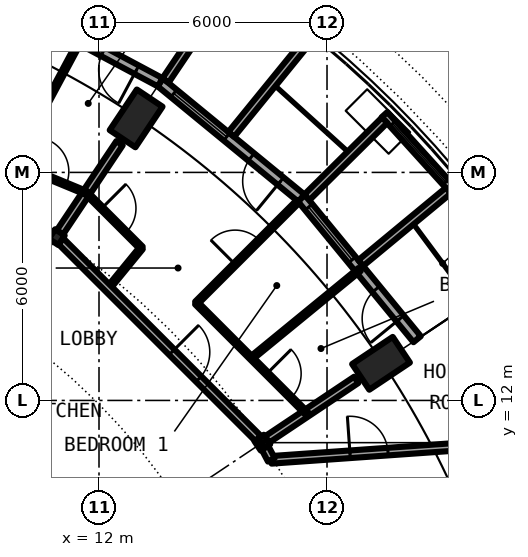
"""IFC4 building model, lengths in metres.
Left out: names, types, materials, properties, quantities, classifications, styles, units other than length and angle.
Written with IfcOpenShell. Run it as: python <this file> out.ifc"""

import sys

from ifc_helpers import new_model, si_unit, direction, frame, frame_2d, origin, origin_2d, place, context, subcontext, project, spatial, rectangle, circle, hollow_circle, i_section, extrude, element, fill, save


model = new_model("IFC4")
c1 = context("Model", 3, precision=1e-05, world=origin(), true_north=direction((0.0, 1.0)))
c2 = subcontext(c1, "Body", "Model", "MODEL_VIEW")
j1 = project(units=[si_unit("LENGTHUNIT", "METRE"), si_unit("PLANEANGLEUNIT", "RADIAN")], contexts=[c1])
p1 = place(None, origin())
s1 = spatial("IfcSite", under=j1, at=p1, CompositionType="ELEMENT")
p2 = place(p1, origin())
s2 = spatial("IfcBuilding", under=s1, at=p2, CompositionType="ELEMENT")
p3 = place(p2, frame((0.0, 0.0, 246.25)))
s3 = spatial("IfcBuildingStorey", under=s2, at=p3, CompositionType="ELEMENT", Elevation=246.25)
for number, where, z_axis, x_axis in (
    (1, (19.955, 13.334, 0.0), (-0.347, -0.232, 0.909), (0.556, -0.831, 0.0)),
    (2, (13.334, 19.955, 0.0), (-0.232, -0.347, 0.909), (0.831, -0.556, 0.0)),
):
    element("IfcColumn", number, at=place(p3, frame(where, z_axis=z_axis, x_axis=x_axis)), inside=s3, PredefinedType="COLUMN", context=c2, shape_type="SweptSolid", body=[
        extrude(hollow_circle(Radius=0.406, WallThickness=0.03, at=origin_2d()), origin(), (0.0, 0.0, 1.0), 3.081),
    ])
for number, where, z_axis, x_axis in (
    (3, (16.297, 10.889, 0.0), (0.0, 0.0, 1.0), (0.831, 0.556, 0.0)),
    (4, (10.889, 16.297, 0.0), (0.0, 0.0, 1.0), (0.556, 0.831, 0.0)),
):
    element("IfcColumn", number, at=place(p3, frame(where, z_axis=z_axis, x_axis=x_axis)), inside=s3, PredefinedType="COLUMN", context=c2, shape_type="SweptSolid", body=[
        extrude(i_section(OverallWidth=0.3, OverallDepth=0.3, WebThickness=0.011, FlangeThickness=0.019, FilletRadius=0.027, at=origin_2d()), origin(), (0.0, 0.0, 1.0), 3.05),
    ])
p4 = place(p3, frame((20.371, 13.611, 0.0), z_axis=(0.0, 0.0, 1.0), x_axis=(-0.634396836208, 0.773007538262, 0.0)))
e5 = element("IfcWall", 5, at=p4, inside=s3, PredefinedType="SOLIDWALL", context=c2, shape_type="SweptSolid", body=[
    extrude(rectangle(XDim=4.803, YDim=0.25, at=frame_2d((2.402, 0.0))), origin(), (0.0, 0.0, 1.0), 2.7),
])
p5 = place(p4, frame((0.704, 0.0, 0.0)))
e6 = element("IfcOpeningElement", 6, at=p5, cuts=e5, PredefinedType="OPENING", context=c2, shape_type="SweptSolid", body=[
    extrude(rectangle(XDim=1.0, YDim=2.2, at=frame_2d((0.5, 1.1))), frame((0.0, 0.135, 0.0), z_axis=(0.0, -1.0, 0.0), x_axis=(1.0, 0.0, 0.0)), (0.0, 0.0, 1.0), 0.27),
])
p6 = place(p4, frame((2.699, 0.0, 0.3)))
e7 = element("IfcOpeningElement", 7, at=p6, cuts=e5, PredefinedType="OPENING", context=c2, shape_type="SweptSolid", body=[
    extrude(rectangle(XDim=1.8, YDim=2.1, at=frame_2d((0.9, 1.05))), frame((0.0, 0.135, 0.0), z_axis=(0.0, -1.0, 0.0), x_axis=(1.0, 0.0, 0.0)), (0.0, 0.0, 1.0), 0.27),
])
p7 = place(p3, frame((21.338, 17.506, -0.03), z_axis=(0.0, 0.0, 1.0), x_axis=(-0.671487056022, 0.741016284298, 0.0)))
e8 = element("IfcWall", 8, at=p7, inside=s3, PredefinedType="SOLIDWALL", context=c2, shape_type="SweptSolid", body=[
    extrude(rectangle(XDim=2.718, YDim=0.2, at=frame_2d((1.359, 0.0))), origin(), (0.0, 0.0, 1.0), 2.73),
])
p8 = place(p7, frame((0.319, 0.0, 0.33)))
e9 = element("IfcOpeningElement", 9, at=p8, cuts=e8, PredefinedType="OPENING", context=c2, shape_type="SweptSolid", body=[
    extrude(circle(Radius=1.04, at=frame_2d((1.04, 1.04))), frame((0.0, 0.11, 0.0), z_axis=(0.0, -1.0, 0.0), x_axis=(1.0, 0.0, 0.0)), (0.0, 0.0, 1.0), 0.22),
])
p9 = place(p3, frame((18.888, 15.615, -0.03), z_axis=(0.0, 0.0, 1.0), x_axis=(0.770489638069, 0.637452521862, 0.0)))
e10 = element("IfcWall", 10, at=p9, inside=s3, PredefinedType="SOLIDWALL", context=c2, shape_type="SweptSolid", body=[
    extrude(rectangle(XDim=2.993, YDim=0.2, at=frame_2d((1.497, 0.0))), origin(), (0.0, 0.0, 1.0), 2.73),
])
p10 = place(p3, frame((17.47, 17.344, -0.03), z_axis=(0.0, 0.0, 1.0), x_axis=(0.709896457854, 0.704306055012, 0.0)))
e11 = element("IfcWall", 11, at=p10, inside=s3, PredefinedType="SOLIDWALL", context=c2, shape_type="SweptSolid", body=[
    extrude(rectangle(XDim=2.882, YDim=0.2, at=frame_2d((1.441, 0.0))), origin(), (0.0, 0.0, 1.0), 2.73),
])
p11 = place(p3, frame((17.324, 17.324, 0.0), z_axis=(0.0, 0.0, 1.0), x_axis=(-0.773007538262, 0.634396836208, 0.0)))
e12 = element("IfcWall", 12, at=p11, inside=s3, PredefinedType="SOLIDWALL", context=c2, shape_type="SweptSolid", body=[
    extrude(rectangle(XDim=4.803, YDim=0.25, at=frame_2d((2.402, 0.0))), origin(), (0.0, 0.0, 1.0), 2.7),
])
p12 = place(p11, frame((0.704, 0.0, 0.0)))
e13 = element("IfcOpeningElement", 13, at=p12, cuts=e12, PredefinedType="OPENING", context=c2, shape_type="SweptSolid", body=[
    extrude(rectangle(XDim=1.0, YDim=2.2, at=frame_2d((0.5, 1.1))), frame((0.0, 0.135, 0.0), z_axis=(0.0, -1.0, 0.0), x_axis=(1.0, 0.0, 0.0)), (0.0, 0.0, 1.0), 0.27),
])
p13 = place(p11, frame((2.542, 0.0, 0.3)))
e14 = element("IfcOpeningElement", 14, at=p13, cuts=e12, PredefinedType="OPENING", context=c2, shape_type="SweptSolid", body=[
    extrude(rectangle(XDim=1.8, YDim=2.1, at=frame_2d((0.9, 1.05))), frame((0.0, 0.135, 0.0), z_axis=(0.0, -1.0, 0.0), x_axis=(1.0, 0.0, 0.0)), (0.0, 0.0, 1.0), 0.27),
])
p14 = place(p3, frame((15.479, 19.0, -0.03), z_axis=(0.0, 0.0, 1.0), x_axis=(0.631209771017, 0.775612161439, 0.0)))
e15 = element("IfcWall", 15, at=p14, inside=s3, PredefinedType="SOLIDWALL", context=c2, shape_type="SweptSolid", body=[
    extrude(rectangle(XDim=2.992, YDim=0.2, at=frame_2d((1.496, 0.0))), origin(), (0.0, 0.0, 1.0), 2.73),
])
p15 = place(p3, frame((13.75, 20.419, -0.03), z_axis=(0.0, 0.0, 1.0), x_axis=(0.558934498222, 0.829211810515, 0.0)))
e16 = element("IfcWall", 16, at=p15, inside=s3, PredefinedType="SOLIDWALL", context=c2, shape_type="SweptSolid", body=[
    extrude(rectangle(XDim=2.882, YDim=0.2, at=frame_2d((1.441, 0.0))), origin(), (0.0, 0.0, 1.0), 2.73),
])
p16 = place(p3, frame((13.611, 20.371, 0.0), z_axis=(0.0, 0.0, 1.0), x_axis=(-0.881903608701, 0.471429766731, 0.0)))
e17 = element("IfcWall", 17, at=p16, inside=s3, PredefinedType="SOLIDWALL", context=c2, shape_type="SweptSolid", body=[
    extrude(rectangle(XDim=4.802, YDim=0.25, at=frame_2d((2.401, 0.0))), origin(), (0.0, 0.0, 1.0), 2.7),
])
p17 = place(p16, frame((0.704, 0.0, 0.0)))
e18 = element("IfcOpeningElement", 18, at=p17, cuts=e17, PredefinedType="OPENING", context=c2, shape_type="SweptSolid", body=[
    extrude(rectangle(XDim=1.0, YDim=2.2, at=frame_2d((0.5, 1.1))), frame((0.0, 0.135, 0.0), z_axis=(0.0, -1.0, 0.0), x_axis=(1.0, 0.0, 0.0)), (0.0, 0.0, 1.0), 0.27),
])
p18 = place(p16, frame((2.699, 0.0, 0.3)))
e19 = element("IfcOpeningElement", 19, at=p18, cuts=e17, PredefinedType="OPENING", context=c2, shape_type="SweptSolid", body=[
    extrude(rectangle(XDim=1.8, YDim=2.1, at=frame_2d((0.9, 1.05))), frame((0.0, 0.135, 0.0), z_axis=(0.0, -1.0, 0.0), x_axis=(1.0, 0.0, 0.0)), (0.0, 0.0, 1.0), 0.27),
])
p19 = place(p3, frame((9.774, 18.245, 0.0), z_axis=(0.0, 0.0, 1.0), x_axis=(0.47239643711, 0.881386184488, 0.0)))
e20 = element("IfcWall", 20, at=p19, inside=s3, PredefinedType="PARTITIONING", context=c2, shape_type="SweptSolid", body=[
    extrude(rectangle(XDim=3.677, YDim=0.1, at=frame_2d((1.839, 0.0))), origin(), (0.0, 0.0, 1.0), 2.7),
])
p20 = place(p3, frame((10.972, 16.422, 0.0), z_axis=(0.0, 0.0, 1.0), x_axis=(0.555797325324, 0.83131782921, 0.0)))
e21 = element("IfcWall", 21, at=p20, inside=s3, PredefinedType="PARTITIONING", context=c2, shape_type="SweptSolid", body=[
    extrude(rectangle(XDim=2.823, YDim=0.2, at=frame_2d((1.412, 0.0))), origin(), (0.0, 0.0, 1.0), 2.7),
])
p21 = place(p3, frame((12.24, 14.945, 0.0), z_axis=(0.0, 0.0, 1.0), x_axis=(0.633719643525, 0.773562805085, 0.0)))
e22 = element("IfcWall", 22, at=p21, inside=s3, PredefinedType="PARTITIONING", context=c2, shape_type="SweptSolid", body=[
    extrude(rectangle(XDim=1.379, YDim=0.1, at=frame_2d((0.689, 0.0))), origin(), (0.0, 0.0, 1.0), 2.7),
])
p22 = place(p3, frame((14.564, 14.564, 0.0), z_axis=(0.0, 0.0, 1.0), x_axis=(0.707106781187, 0.707106781187, 0.0)))
e23 = element("IfcWall", 23, at=p22, inside=s3, PredefinedType="PARTITIONING", context=c2, shape_type="SweptSolid", body=[
    extrude(rectangle(XDim=3.779, YDim=0.1, at=frame_2d((1.89, 0.0))), origin(), (0.0, 0.0, 1.0), 2.7),
])
p23 = place(p22, frame((1.439, 0.0, 0.0)))
e24 = element("IfcOpeningElement", 24, at=p23, cuts=e23, PredefinedType="OPENING", context=c2, shape_type="SweptSolid", body=[
    extrude(rectangle(XDim=0.9, YDim=2.3, at=frame_2d((0.45, 1.15))), frame((0.0, 0.06, 0.0), z_axis=(0.0, -1.0, 0.0), x_axis=(1.0, 0.0, 0.0)), (0.0, 0.0, 1.0), 0.12),
])
p24 = place(p3, frame((16.012, 13.115, 0.0), z_axis=(0.0, 0.0, 1.0), x_axis=(0.773640700514, 0.633624546958, 0.0)))
e25 = element("IfcWall", 25, at=p24, inside=s3, PredefinedType="PARTITIONING", context=c2, shape_type="SweptSolid", body=[
    extrude(rectangle(XDim=3.677, YDim=0.1, at=frame_2d((1.839, 0.0))), origin(), (0.0, 0.0, 1.0), 2.7),
])
p25 = place(p3, frame((16.422, 10.972, 0.0), z_axis=(0.0, 0.0, 1.0), x_axis=(0.83131782921, 0.555797325324, 0.0)))
e26 = element("IfcWall", 26, at=p25, inside=s3, PredefinedType="PARTITIONING", context=c2, shape_type="SweptSolid", body=[
    extrude(rectangle(XDim=2.823, YDim=0.2, at=frame_2d((1.412, 0.0))), origin(), (0.0, 0.0, 1.0), 2.7),
])
p26 = place(p3, frame((16.535, 10.437, 0.0), z_axis=(0.0, 0.0, 1.0), x_axis=(0.997515141784, 0.070452408845, 0.0)))
e27 = element("IfcWall", 27, at=p26, inside=s3, PredefinedType="PARTITIONING", context=c2, shape_type="SweptSolid", body=[
    extrude(rectangle(XDim=5.153, YDim=0.2, at=frame_2d((2.576, 0.0))), origin(), (0.0, 0.0, 1.0), 2.7),
])
p27 = place(p26, frame((2.076, 0.0, 0.0)))
e28 = element("IfcOpeningElement", 28, at=p27, cuts=e27, PredefinedType="OPENING", context=c2, shape_type="SweptSolid", body=[
    extrude(rectangle(XDim=1.0, YDim=2.3, at=frame_2d((0.5, 1.15))), frame((0.0, 0.11, 0.0), z_axis=(0.0, -1.0, 0.0), x_axis=(1.0, 0.0, 0.0)), (0.0, 0.0, 1.0), 0.22),
])
p28 = place(p3, frame((4.355, 14.353, 0.0), z_axis=(0.0, 0.0, 1.0), x_axis=(0.80325776554, -0.595631565735, 0.0)))
e29 = element("IfcWall", 29, at=p28, inside=s3, PredefinedType="PARTITIONING", context=c2, shape_type="SweptSolid", body=[
    extrude(rectangle(XDim=8.987, YDim=0.2, at=frame_2d((4.494, 0.0))), origin(), (0.0, 0.0, 1.0), 2.7),
])
p29 = place(p28, frame((3.83, 0.0, 0.0)))
e30 = element("IfcOpeningElement", 30, at=p29, cuts=e29, PredefinedType="OPENING", context=c2, shape_type="SweptSolid", body=[
    extrude(rectangle(XDim=1.0, YDim=2.3, at=frame_2d((0.5, 1.15))), frame((0.0, 0.11, 0.0), z_axis=(0.0, -1.0, 0.0), x_axis=(1.0, 0.0, 0.0)), (0.0, 0.0, 1.0), 0.22),
])
p30 = place(p3, frame((3.965, 19.165, 0.0), z_axis=(0.0, 0.0, 1.0), x_axis=(0.923857139404, -0.382737489635, 0.0)))
e31 = element("IfcWall", 31, at=p30, inside=s3, PredefinedType="PARTITIONING", context=c2, shape_type="SweptSolid", body=[
    extrude(rectangle(XDim=7.342, YDim=0.2, at=frame_2d((3.671, 0.0))), origin(), (0.0, 0.0, 1.0), 2.45),
])
p31 = place(p30, frame((4.126, 0.0, 0.0)))
e32 = element("IfcOpeningElement", 32, at=p31, cuts=e31, PredefinedType="OPENING", context=c2, shape_type="SweptSolid", body=[
    extrude(rectangle(XDim=1.0, YDim=2.3, at=frame_2d((0.5, 1.15))), frame((0.0, 0.11, 0.0), z_axis=(0.0, -1.0, 0.0), x_axis=(1.0, 0.0, 0.0)), (0.0, 0.0, 1.0), 0.22),
])
p32 = place(p3, frame((10.997, 16.189, 0.0), z_axis=(0.0, 0.0, 1.0), x_axis=(0.707106781187, -0.707106781187, 0.0)))
e33 = element("IfcWall", 33, at=p32, inside=s3, PredefinedType="PARTITIONING", context=c2, shape_type="SweptSolid", body=[
    extrude(rectangle(XDim=7.343, YDim=0.2, at=frame_2d((3.671, 0.0))), origin(), (0.0, 0.0, 1.0), 2.45),
])
p33 = place(p32, frame((4.127, 0.0, 0.0)))
e34 = element("IfcOpeningElement", 34, at=p33, cuts=e33, PredefinedType="OPENING", context=c2, shape_type="SweptSolid", body=[
    extrude(rectangle(XDim=1.0, YDim=2.3, at=frame_2d((0.5, 1.15))), frame((0.0, 0.11, 0.0), z_axis=(0.0, -1.0, 0.0), x_axis=(1.0, 0.0, 0.0)), (0.0, 0.0, 1.0), 0.22),
])
p34 = place(p3, frame((16.367, 10.756, 0.0), z_axis=(0.0, 0.0, 1.0), x_axis=(0.465802239822, -0.884888848035, 0.0)))
e35 = element("IfcWall", 35, at=p34, inside=s3, PredefinedType="PARTITIONING", context=c2, shape_type="SweptSolid", body=[
    extrude(rectangle(XDim=0.361, YDim=0.2, at=frame_2d((0.18, 0.0))), origin(), (0.0, 0.0, 1.0), 2.7),
])
p35 = place(p3, frame((7.88, 19.03, 0.0), z_axis=(0.0, 0.0, 1.0), x_axis=(0.92382889974, -0.382805647824, 0.0)))
e36 = element("IfcWall", 36, at=p35, inside=s3, PredefinedType="PARTITIONING", context=c2, shape_type="SweptSolid", body=[
    extrude(rectangle(XDim=4.102, YDim=0.1, at=frame_2d((2.051, 0.0))), origin(), (0.0, 0.0, 1.0), 2.7),
])
p36 = place(p35, frame((2.626, 0.0, 0.0)))
e37 = element("IfcOpeningElement", 37, at=p36, cuts=e36, PredefinedType="OPENING", context=c2, shape_type="SweptSolid", body=[
    extrude(rectangle(XDim=0.9, YDim=2.3, at=frame_2d((0.45, 1.15))), frame((0.0, 0.06, 0.0), z_axis=(0.0, -1.0, 0.0), x_axis=(1.0, 0.0, 0.0)), (0.0, 0.0, 1.0), 0.12),
])
p37 = place(p3, frame((11.667, 17.461, 0.0), z_axis=(0.0, 0.0, 1.0), x_axis=(0.706868377032, -0.707345104989, 0.0)))
e38 = element("IfcWall", 38, at=p37, inside=s3, PredefinedType="PARTITIONING", context=c2, shape_type="SweptSolid", body=[
    extrude(rectangle(XDim=2.049, YDim=0.1, at=frame_2d((1.024, 0.0))), origin(), (0.0, 0.0, 1.0), 2.7),
])
p38 = place(p37, frame((0.574, 0.0, 0.0)))
e39 = element("IfcOpeningElement", 39, at=p38, cuts=e38, PredefinedType="OPENING", context=c2, shape_type="SweptSolid", body=[
    extrude(rectangle(XDim=0.9, YDim=2.3, at=frame_2d((0.45, 1.15))), frame((0.0, 0.06, 0.0), z_axis=(0.0, -1.0, 0.0), x_axis=(1.0, 0.0, 0.0)), (0.0, 0.0, 1.0), 0.12),
])
p39 = place(p3, frame((14.563, 14.563, 0.0), z_axis=(0.0, 0.0, 1.0), x_axis=(0.70686919808, -0.707344284494, 0.0)))
e40 = element("IfcWall", 40, at=p39, inside=s3, PredefinedType="PARTITIONING", context=c2, shape_type="SweptSolid", body=[
    extrude(rectangle(XDim=4.111, YDim=0.1, at=frame_2d((2.056, 0.0))), origin(), (0.0, 0.0, 1.0), 2.7),
])
p40 = place(p39, frame((2.626, 0.0, 0.0)))
e41 = element("IfcOpeningElement", 41, at=p40, cuts=e40, PredefinedType="OPENING", context=c2, shape_type="SweptSolid", body=[
    extrude(rectangle(XDim=0.9, YDim=2.3, at=frame_2d((0.45, 1.15))), frame((0.0, 0.06, 0.0), z_axis=(0.0, -1.0, 0.0), x_axis=(1.0, 0.0, 0.0)), (0.0, 0.0, 1.0), 0.12),
])
p41 = place(p5, origin())
e42 = element("IfcDoor", 42, at=p41, inside=s3, OperationType="SINGLE_SWING_LEFT", PredefinedType="DOOR", context=c2, shape_type="SweptSolid", body=[
    extrude(rectangle(XDim=1.0, YDim=2.2, at=frame_2d((0.5, 1.1))), frame((0.0, 0.025, 0.0), z_axis=(0.0, -1.0, 0.0), x_axis=(1.0, 0.0, 0.0)), (0.0, 0.0, 1.0), 0.05),
])
fill(e6, e42)
p42 = place(p6, origin())
e43 = element("IfcWindow", 43, at=p42, inside=s3, PartitioningType="SINGLE_PANEL", PredefinedType="WINDOW", context=c2, shape_type="SweptSolid", body=[
    extrude(rectangle(XDim=1.8, YDim=2.1, at=frame_2d((0.9, 1.05))), frame((0.0, 0.03, 0.0), z_axis=(0.0, -1.0, 0.0), x_axis=(1.0, 0.0, 0.0)), (0.0, 0.0, 1.0), 0.06),
])
fill(e7, e43)
p43 = place(p8, origin())
e44 = element("IfcWindow", 44, at=p43, inside=s3, PartitioningType="SINGLE_PANEL", PredefinedType="WINDOW", context=c2, shape_type="SweptSolid", body=[
    extrude(circle(Radius=1.04, at=frame_2d((1.04, 1.04))), frame((0.0, 0.03, 0.0), z_axis=(0.0, -1.0, 0.0), x_axis=(1.0, 0.0, 0.0)), (0.0, 0.0, 1.0), 0.06),
])
fill(e9, e44)
p44 = place(p12, origin())
e45 = element("IfcDoor", 45, at=p44, inside=s3, OperationType="SINGLE_SWING_LEFT", PredefinedType="DOOR", context=c2, shape_type="SweptSolid", body=[
    extrude(rectangle(XDim=1.0, YDim=2.2, at=frame_2d((0.5, 1.1))), frame((0.0, 0.025, 0.0), z_axis=(0.0, -1.0, 0.0), x_axis=(1.0, 0.0, 0.0)), (0.0, 0.0, 1.0), 0.05),
])
fill(e13, e45)
p45 = place(p13, origin())
e46 = element("IfcWindow", 46, at=p45, inside=s3, PartitioningType="SINGLE_PANEL", PredefinedType="WINDOW", context=c2, shape_type="SweptSolid", body=[
    extrude(rectangle(XDim=1.8, YDim=2.1, at=frame_2d((0.9, 1.05))), frame((0.0, 0.03, 0.0), z_axis=(0.0, -1.0, 0.0), x_axis=(1.0, 0.0, 0.0)), (0.0, 0.0, 1.0), 0.06),
])
fill(e14, e46)
p46 = place(p17, origin())
e47 = element("IfcDoor", 47, at=p46, inside=s3, OperationType="SINGLE_SWING_LEFT", PredefinedType="DOOR", context=c2, shape_type="SweptSolid", body=[
    extrude(rectangle(XDim=1.0, YDim=2.2, at=frame_2d((0.5, 1.1))), frame((0.0, 0.025, 0.0), z_axis=(0.0, -1.0, 0.0), x_axis=(1.0, 0.0, 0.0)), (0.0, 0.0, 1.0), 0.05),
])
fill(e18, e47)
p47 = place(p33, origin())
e48 = element("IfcDoor", 48, at=p47, inside=s3, OperationType="SINGLE_SWING_RIGHT", PredefinedType="DOOR", context=c2, shape_type="SweptSolid", body=[
    extrude(rectangle(XDim=1.0, YDim=2.3, at=frame_2d((0.5, 1.15))), frame((0.0, 0.025, 0.0), z_axis=(0.0, -1.0, 0.0), x_axis=(1.0, 0.0, 0.0)), (0.0, 0.0, 1.0), 0.05),
])
fill(e34, e48)
p48 = place(p38, origin())
e49 = element("IfcDoor", 49, at=p48, inside=s3, OperationType="SINGLE_SWING_RIGHT", PredefinedType="DOOR", context=c2, shape_type="SweptSolid", body=[
    extrude(rectangle(XDim=0.9, YDim=2.3, at=frame_2d((0.45, 1.15))), frame((0.0, 0.025, 0.0), z_axis=(0.0, -1.0, 0.0), x_axis=(1.0, 0.0, 0.0)), (0.0, 0.0, 1.0), 0.05),
])
fill(e39, e49)
p49 = place(p23, origin())
e50 = element("IfcDoor", 50, at=p49, inside=s3, OperationType="SINGLE_SWING_LEFT", PredefinedType="DOOR", context=c2, shape_type="SweptSolid", body=[
    extrude(rectangle(XDim=0.9, YDim=2.3, at=frame_2d((0.45, 1.15))), frame((0.0, 0.025, 0.0), z_axis=(0.0, -1.0, 0.0), x_axis=(1.0, 0.0, 0.0)), (0.0, 0.0, 1.0), 0.05),
])
fill(e24, e50)
p50 = place(p40, origin())
e51 = element("IfcDoor", 51, at=p50, inside=s3, OperationType="SINGLE_SWING_RIGHT", PredefinedType="DOOR", context=c2, shape_type="SweptSolid", body=[
    extrude(rectangle(XDim=0.9, YDim=2.3, at=frame_2d((0.45, 1.15))), frame((0.0, 0.025, 0.0), z_axis=(0.0, -1.0, 0.0), x_axis=(1.0, 0.0, 0.0)), (0.0, 0.0, 1.0), 0.05),
])
fill(e41, e51)
p51 = place(p36, origin())
e52 = element("IfcDoor", 52, at=p51, inside=s3, OperationType="SINGLE_SWING_RIGHT", PredefinedType="DOOR", context=c2, shape_type="SweptSolid", body=[
    extrude(rectangle(XDim=0.9, YDim=2.3, at=frame_2d((0.45, 1.15))), frame((0.0, 0.025, 0.0), z_axis=(0.0, -1.0, 0.0), x_axis=(1.0, 0.0, 0.0)), (0.0, 0.0, 1.0), 0.05),
])
fill(e37, e52)
p52 = place(p27, origin())
e53 = element("IfcDoor", 53, at=p52, inside=s3, OperationType="SINGLE_SWING_LEFT", PredefinedType="DOOR", context=c2, shape_type="SweptSolid", body=[
    extrude(rectangle(XDim=1.0, YDim=2.3, at=frame_2d((0.5, 1.15))), frame((0.0, 0.025, 0.0), z_axis=(0.0, -1.0, 0.0), x_axis=(1.0, 0.0, 0.0)), (0.0, 0.0, 1.0), 0.05),
])
fill(e28, e53)
save(model, sys.argv[1])
